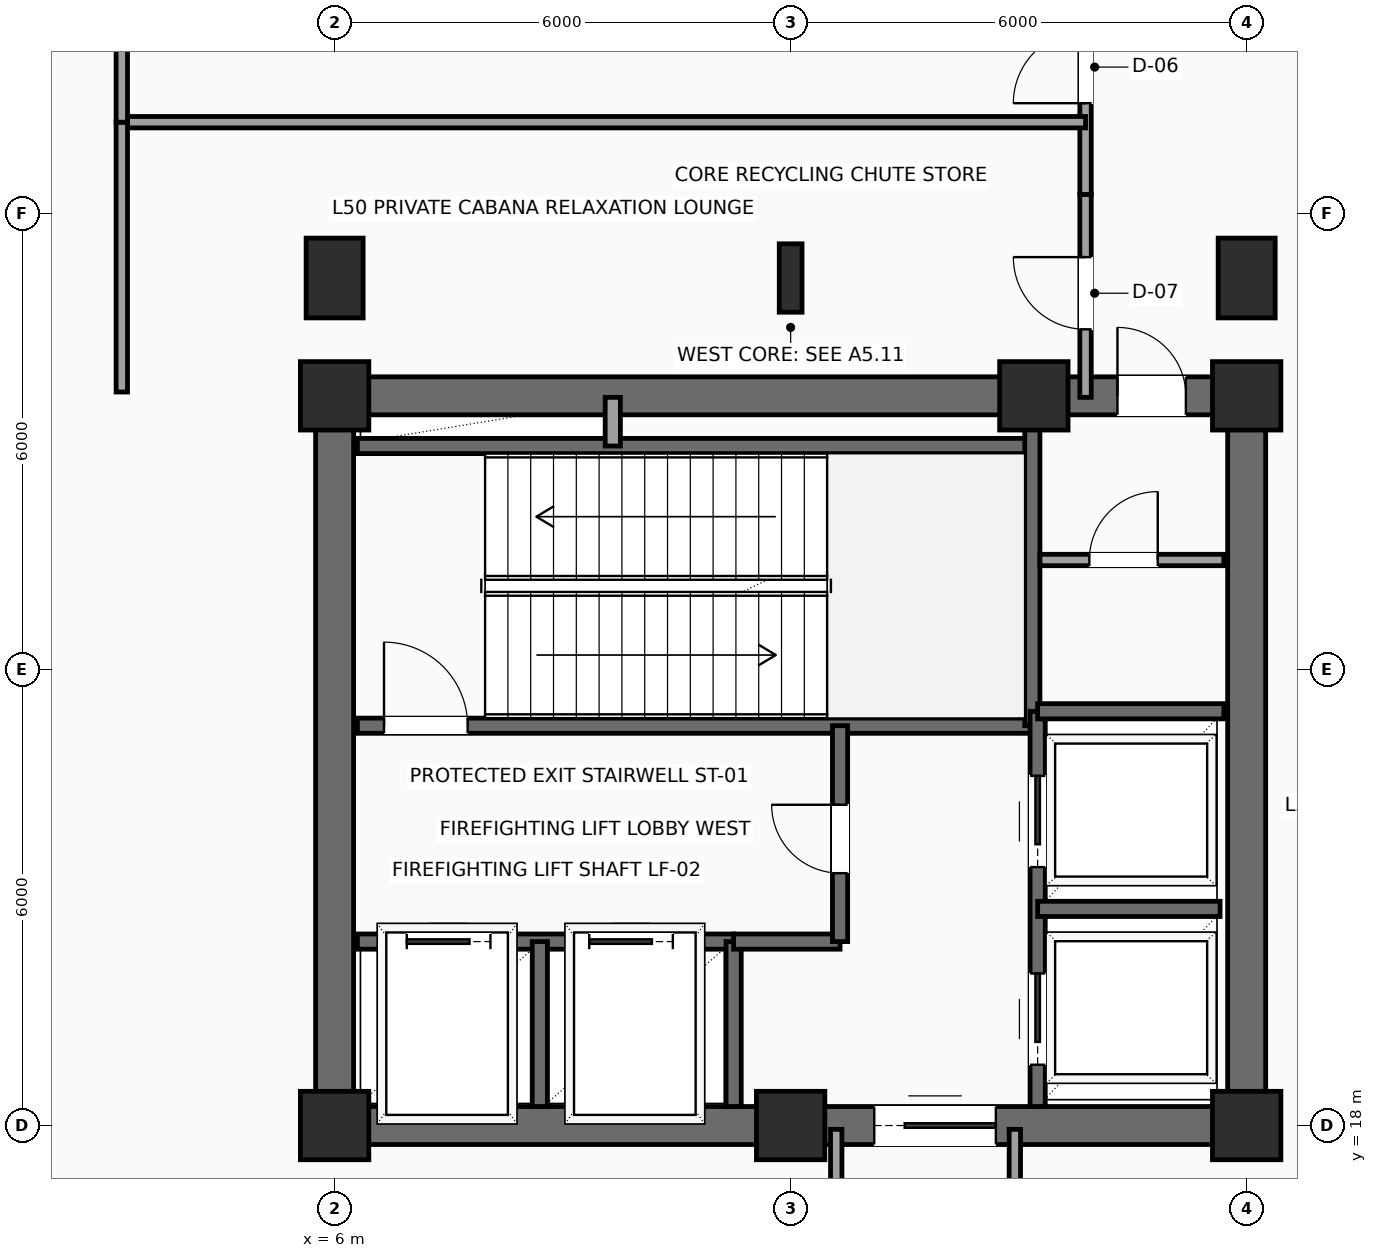
"""IFC4 building model, lengths in metres.
Left out: names, types, materials, properties, quantities, classifications, styles, units other than length and angle.
Written with IfcOpenShell. Run it as: python <this file> out.ifc"""

import sys

from ifc_helpers import new_model, si_unit, direction, frame, frame_2d, origin, origin_2d, place, context, subcontext, project, spatial, rectangle, i_section, extrude, element, fill, save


model = new_model("IFC4")
c1 = context("Model", 3, precision=1e-05, world=origin(), true_north=direction((0.0, 1.0)))
c2 = subcontext(c1, "Body", "Model", "MODEL_VIEW")
j1 = project(units=[si_unit("LENGTHUNIT", "METRE"), si_unit("PLANEANGLEUNIT", "RADIAN")], contexts=[c1])
p1 = place(None, origin())
s1 = spatial("IfcSite", under=j1, at=p1, CompositionType="ELEMENT")
p2 = place(p1, origin())
s2 = spatial("IfcBuilding", under=s1, at=p2, CompositionType="ELEMENT")
p3 = place(p2, frame((0.0, 0.0, 204.0)))
s3 = spatial("IfcBuildingStorey", under=s2, at=p3, CompositionType="ELEMENT", Elevation=204.0)
for number, where, z_axis, x_axis in (
    (1, (6.0, 18.0, 0.0), (0.0, 0.0, 1.0), (1.0, 0.0, 0.0)),
    (2, (12.0, 18.0, 0.0), (0.0, 0.0, 1.0), (1.0, 0.0, 0.0)),
    (3, (18.0, 18.0, 0.0), (0.0, 0.0, 1.0), (1.0, 0.0, 0.0)),
    (4, (6.0, 27.6, 0.0), (0.0, 0.0, 1.0), (1.0, 0.0, 0.0)),
    (5, (15.2, 27.6, 0.0), (0.0, 0.0, 1.0), (1.0, 0.0, 0.0)),
    (6, (18.0, 27.6, 0.0), (0.0, 0.0, 1.0), (1.0, 0.0, 0.0)),
):
    element("IfcColumn", number, at=place(p3, frame(where, z_axis=z_axis, x_axis=x_axis)), inside=s3, PredefinedType="COLUMN", context=c2, shape_type="SweptSolid", body=[
        extrude(rectangle(XDim=0.9, YDim=0.9, at=origin_2d()), origin(), (0.0, 0.0, 1.0), 4.65),
    ])
p4 = place(p3, frame((6.0, 29.15, 0.0), z_axis=(0.0, 0.0, 1.0), x_axis=(1.0, 0.0, 0.0)))
e7 = element("IfcColumn", 7, at=p4, inside=s3, PredefinedType="COLUMN", context=c2, shape_type="SweptSolid", body=[
    extrude(rectangle(XDim=0.75, YDim=1.05, at=origin_2d()), origin(), (0.0, 0.0, 1.0), 4.65),
])
p5 = place(p3, frame((12.0, 29.15, 0.0), z_axis=(0.0, 0.0, 1.0), x_axis=(1.0, 0.0, 0.0)))
e8 = element("IfcColumn", 8, at=p5, inside=s3, PredefinedType="COLUMN", context=c2, shape_type="SweptSolid", body=[
    extrude(i_section(OverallWidth=0.3, OverallDepth=0.9, WebThickness=0.019, FlangeThickness=0.035, FilletRadius=0.03, at=origin_2d()), origin(), (0.0, 0.0, 1.0), 4.65),
])
p6 = place(p3, frame((18.0, 29.15, 0.0), z_axis=(0.0, 0.0, 1.0), x_axis=(1.0, 0.0, 0.0)))
e9 = element("IfcColumn", 9, at=p6, inside=s3, PredefinedType="COLUMN", context=c2, shape_type="SweptSolid", body=[
    extrude(rectangle(XDim=0.75, YDim=1.05, at=origin_2d()), origin(), (0.0, 0.0, 1.0), 4.65),
])
p7 = place(p3, frame((6.0, 18.0, 0.0), z_axis=(0.0, 0.0, 1.0), x_axis=(1.0, 0.0, 0.0)))
e10 = element("IfcWall", 10, at=p7, inside=s3, PredefinedType="SHEAR", context=c2, shape_type="SweptSolid", body=[
    extrude(rectangle(XDim=12.0, YDim=0.5, at=frame_2d((6.0, 0.0))), origin(), (0.0, 0.0, 1.0), 4.44),
])
p8 = place(p7, frame((7.1, 0.0, 0.0)))
e11 = element("IfcOpeningElement", 11, at=p8, cuts=e10, PredefinedType="OPENING", context=c2, shape_type="SweptSolid", body=[
    extrude(rectangle(XDim=1.6, YDim=2.3, at=frame_2d((0.8, 1.15))), frame((0.0, 0.26, 0.0), z_axis=(0.0, -1.0, 0.0), x_axis=(1.0, 0.0, 0.0)), (0.0, 0.0, 1.0), 0.52),
])
p9 = place(p3, frame((6.0, 27.6, 0.0), z_axis=(0.0, 0.0, 1.0), x_axis=(1.0, 0.0, 0.0)))
e12 = element("IfcWall", 12, at=p9, inside=s3, PredefinedType="SHEAR", context=c2, shape_type="SweptSolid", body=[
    extrude(rectangle(XDim=12.0, YDim=0.5, at=frame_2d((6.0, 0.0))), origin(), (0.0, 0.0, 1.0), 4.44),
])
p10 = place(p9, frame((10.3, 0.0, 0.0)))
e13 = element("IfcOpeningElement", 13, at=p10, cuts=e12, PredefinedType="OPENING", context=c2, shape_type="SweptSolid", body=[
    extrude(rectangle(XDim=0.9, YDim=2.15, at=frame_2d((0.45, 1.075))), frame((0.0, 0.26, 0.0), z_axis=(0.0, -1.0, 0.0), x_axis=(1.0, 0.0, 0.0)), (0.0, 0.0, 1.0), 0.52),
])
for number, where, z_axis, x_axis in (
    (14, (6.0, 18.0, 0.0), (0.0, 0.0, 1.0), (0.0, 1.0, 0.0)),
    (15, (18.0, 18.0, 0.0), (0.0, 0.0, 1.0), (0.0, 1.0, 0.0)),
):
    element("IfcWall", number, at=place(p3, frame(where, z_axis=z_axis, x_axis=x_axis)), inside=s3, PredefinedType="SHEAR", context=c2, shape_type="SweptSolid", body=[
        extrude(rectangle(XDim=9.6, YDim=0.5, at=frame_2d((4.8, 0.0))), origin(), (0.0, 0.0, 1.0), 4.44),
    ])
p11 = place(p3, frame((6.3, 23.26, 0.0), z_axis=(0.0, 0.0, 1.0), x_axis=(1.0, 0.0, 0.0)))
e16 = element("IfcWall", 16, at=p11, inside=s3, PredefinedType="SHEAR", context=c2, shape_type="SweptSolid", body=[
    extrude(rectangle(XDim=8.88, YDim=0.2, at=frame_2d((4.44, 0.0))), origin(), (0.0, 0.0, 1.0), 4.44),
])
p12 = place(p11, frame((0.35, 0.0, 0.0)))
e17 = element("IfcOpeningElement", 17, at=p12, cuts=e16, PredefinedType="OPENING", context=c2, shape_type="SweptSolid", body=[
    extrude(rectangle(XDim=1.1, YDim=2.2, at=frame_2d((0.55, 1.1))), frame((0.0, 0.11, 0.0), z_axis=(0.0, -1.0, 0.0), x_axis=(1.0, 0.0, 0.0)), (0.0, 0.0, 1.0), 0.22),
])
p13 = place(p3, frame((6.3, 26.94, 0.0), z_axis=(0.0, 0.0, 1.0), x_axis=(1.0, 0.0, 0.0)))
e18 = element("IfcWall", 18, at=p13, inside=s3, PredefinedType="SHEAR", context=c2, shape_type="SweptSolid", body=[
    extrude(rectangle(XDim=8.88, YDim=0.2, at=frame_2d((4.44, 0.0))), origin(), (0.0, 0.0, 1.0), 4.44),
])
p14 = place(p3, frame((15.18, 23.26, 0.0), z_axis=(0.0, 0.0, 1.0), x_axis=(0.0, 1.0, 0.0)))
e19 = element("IfcWall", 19, at=p14, inside=s3, PredefinedType="SHEAR", context=c2, shape_type="SweptSolid", body=[
    extrude(rectangle(XDim=4.04, YDim=0.2, at=frame_2d((2.02, 0.0))), origin(), (0.0, 0.0, 1.0), 4.44),
])
p15 = place(p3, frame((6.3, 20.42, 0.0), z_axis=(0.0, 0.0, 1.0), x_axis=(1.0, 0.0, 0.0)))
e20 = element("IfcWall", 20, at=p15, inside=s3, PredefinedType="SHEAR", context=c2, shape_type="SweptSolid", body=[
    extrude(rectangle(XDim=4.95, YDim=0.2, at=frame_2d((2.475, 0.0))), origin(), (0.0, 0.0, 1.0), 4.44),
])
p16 = place(p15, frame((0.65, 0.0, 0.0)))
e21 = element("IfcOpeningElement", 21, at=p16, cuts=e20, PredefinedType="OPENING", context=c2, shape_type="SweptSolid", body=[
    extrude(rectangle(XDim=1.1, YDim=2.2, at=frame_2d((0.55, 1.1))), frame((0.0, 0.11, 0.0), z_axis=(0.0, -1.0, 0.0), x_axis=(1.0, 0.0, 0.0)), (0.0, 0.0, 1.0), 0.22),
])
p17 = place(p15, frame((3.05, 0.0, 0.0)))
e22 = element("IfcOpeningElement", 22, at=p17, cuts=e20, PredefinedType="OPENING", context=c2, shape_type="SweptSolid", body=[
    extrude(rectangle(XDim=1.1, YDim=2.2, at=frame_2d((0.55, 1.1))), frame((0.0, 0.11, 0.0), z_axis=(0.0, -1.0, 0.0), x_axis=(1.0, 0.0, 0.0)), (0.0, 0.0, 1.0), 0.22),
])
for number, where, z_axis, x_axis in (
    (23, (8.7, 18.25, 0.0), (0.0, 0.0, 1.0), (0.0, 1.0, 0.0)),
    (24, (11.25, 18.25, 0.0), (0.0, 0.0, 1.0), (0.0, 1.0, 0.0)),
):
    element("IfcWall", number, at=place(p3, frame(where, z_axis=z_axis, x_axis=x_axis)), inside=s3, PredefinedType="SHEAR", context=c2, shape_type="SweptSolid", body=[
        extrude(rectangle(XDim=2.17, YDim=0.2, at=frame_2d((1.085, 0.0))), origin(), (0.0, 0.0, 1.0), 4.44),
    ])
p18 = place(p3, frame((11.25, 20.42, 0.0), z_axis=(0.0, 0.0, 1.0), x_axis=(1.0, 0.0, 0.0)))
e25 = element("IfcWall", 25, at=p18, inside=s3, PredefinedType="SHEAR", context=c2, shape_type="SweptSolid", body=[
    extrude(rectangle(XDim=1.4, YDim=0.2, at=frame_2d((0.7, 0.0))), origin(), (0.0, 0.0, 1.0), 4.44),
])
p19 = place(p3, frame((12.65, 20.42, 0.0), z_axis=(0.0, 0.0, 1.0), x_axis=(0.0, 1.0, 0.0)))
e26 = element("IfcWall", 26, at=p19, inside=s3, PredefinedType="SHEAR", context=c2, shape_type="SweptSolid", body=[
    extrude(rectangle(XDim=2.84, YDim=0.2, at=frame_2d((1.42, 0.0))), origin(), (0.0, 0.0, 1.0), 4.44),
])
p20 = place(p19, frame((0.9, 0.0, 0.0)))
e27 = element("IfcOpeningElement", 27, at=p20, cuts=e26, PredefinedType="OPENING", context=c2, shape_type="SweptSolid", body=[
    extrude(rectangle(XDim=0.9, YDim=2.15, at=frame_2d((0.45, 1.075))), frame((0.0, 0.11, 0.0), z_axis=(0.0, -1.0, 0.0), x_axis=(1.0, 0.0, 0.0)), (0.0, 0.0, 1.0), 0.22),
])
p21 = place(p3, frame((9.66, 26.94, 0.0), z_axis=(0.0, 0.0, 1.0), x_axis=(0.0, 1.0, 0.0)))
e28 = element("IfcWall", 28, at=p21, inside=s3, PredefinedType="SOLIDWALL", context=c2, shape_type="SweptSolid", body=[
    extrude(rectangle(XDim=0.64, YDim=0.2, at=frame_2d((0.32, 0.0))), origin(), (0.0, 0.0, 1.0), 4.44),
])
p22 = place(p3, frame((15.25, 18.25, 0.0), z_axis=(0.0, 0.0, 1.0), x_axis=(0.0, 1.0, 0.0)))
e29 = element("IfcWall", 29, at=p22, inside=s3, PredefinedType="SHEAR", context=c2, shape_type="SweptSolid", body=[
    extrude(rectangle(XDim=5.2, YDim=0.2, at=frame_2d((2.6, 0.0))), origin(), (0.0, 0.0, 1.0), 4.44),
])
p23 = place(p22, frame((0.55, 0.0, 0.0)))
e30 = element("IfcOpeningElement", 30, at=p23, cuts=e29, PredefinedType="OPENING", context=c2, shape_type="SweptSolid", body=[
    extrude(rectangle(XDim=1.2, YDim=2.2, at=frame_2d((0.6, 1.1))), frame((0.0, 0.11, 0.0), z_axis=(0.0, -1.0, 0.0), x_axis=(1.0, 0.0, 0.0)), (0.0, 0.0, 1.0), 0.22),
])
p24 = place(p22, frame((3.15, 0.0, 0.0)))
e31 = element("IfcOpeningElement", 31, at=p24, cuts=e29, PredefinedType="OPENING", context=c2, shape_type="SweptSolid", body=[
    extrude(rectangle(XDim=1.2, YDim=2.2, at=frame_2d((0.6, 1.1))), frame((0.0, 0.11, 0.0), z_axis=(0.0, -1.0, 0.0), x_axis=(1.0, 0.0, 0.0)), (0.0, 0.0, 1.0), 0.22),
])
p25 = place(p3, frame((15.25, 20.85, 0.0), z_axis=(0.0, 0.0, 1.0), x_axis=(1.0, 0.0, 0.0)))
e32 = element("IfcWall", 32, at=p25, inside=s3, PredefinedType="SHEAR", context=c2, shape_type="SweptSolid", body=[
    extrude(rectangle(XDim=2.4, YDim=0.2, at=frame_2d((1.2, 0.0))), origin(), (0.0, 0.0, 1.0), 4.44),
])
p26 = place(p3, frame((15.25, 23.45, 0.0), z_axis=(0.0, 0.0, 1.0), x_axis=(1.0, 0.0, 0.0)))
e33 = element("IfcWall", 33, at=p26, inside=s3, PredefinedType="SHEAR", context=c2, shape_type="SweptSolid", body=[
    extrude(rectangle(XDim=2.45, YDim=0.2, at=frame_2d((1.225, 0.0))), origin(), (0.0, 0.0, 1.0), 4.44),
])
p27 = place(p3, frame((15.28, 25.44, 0.0), z_axis=(0.0, 0.0, 1.0), x_axis=(1.0, 0.0, 0.0)))
e34 = element("IfcWall", 34, at=p27, inside=s3, PredefinedType="PARTITIONING", context=c2, shape_type="SweptSolid", body=[
    extrude(rectangle(XDim=2.42, YDim=0.15, at=frame_2d((1.21, 0.0))), origin(), (0.0, 0.0, 1.0), 4.44),
])
p28 = place(p27, frame((0.65, 0.0, 0.0)))
e35 = element("IfcOpeningElement", 35, at=p28, cuts=e34, PredefinedType="OPENING", context=c2, shape_type="SweptSolid", body=[
    extrude(rectangle(XDim=0.9, YDim=2.15, at=frame_2d((0.45, 1.075))), frame((0.0, 0.085, 0.0), z_axis=(0.0, -1.0, 0.0), x_axis=(1.0, 0.0, 0.0)), (0.0, 0.0, 1.0), 0.17),
])
for number, where, z_axis, x_axis in (
    (36, (12.6, 16.15, 0.0), (0.0, 0.0, 1.0), (0.0, 1.0, 0.0)),
    (37, (14.95, 17.95, 0.0), (0.0, 0.0, 1.0), (0.0, -1.0, 0.0)),
):
    element("IfcWall", number, at=place(p3, frame(where, z_axis=z_axis, x_axis=x_axis)), inside=s3, PredefinedType="PARTITIONING", context=c2, shape_type="SweptSolid", body=[
        extrude(rectangle(XDim=1.8, YDim=0.15, at=frame_2d((0.9, 0.0))), origin(), (0.0, 0.0, 1.0), 4.44),
    ])
p29 = place(p3, frame((15.88, 27.58, 0.0), z_axis=(0.0, 0.0, 1.0), x_axis=(0.0, 1.0, 0.0)))
e38 = element("IfcWall", 38, at=p29, inside=s3, PredefinedType="PARTITIONING", context=c2, shape_type="SweptSolid", body=[
    extrude(rectangle(XDim=2.67, YDim=0.15, at=frame_2d((1.335, 0.0))), origin(), (0.0, 0.0, 1.0), 4.44),
])
p30 = place(p29, frame((0.895, 0.0, 0.0)))
e39 = element("IfcOpeningElement", 39, at=p30, cuts=e38, PredefinedType="OPENING", context=c2, shape_type="SweptSolid", body=[
    extrude(rectangle(XDim=0.95, YDim=2.15, at=frame_2d((0.475, 1.075))), frame((0.0, 0.085, 0.0), z_axis=(0.0, -1.0, 0.0), x_axis=(1.0, 0.0, 0.0)), (0.0, 0.0, 1.0), 0.17),
])
p31 = place(p3, frame((15.88, 30.25, 0.0), z_axis=(0.0, 0.0, 1.0), x_axis=(0.0, 1.0, 0.0)))
e40 = element("IfcWall", 40, at=p31, inside=s3, PredefinedType="PARTITIONING", context=c2, shape_type="SweptSolid", body=[
    extrude(rectangle(XDim=2.4, YDim=0.15, at=frame_2d((1.2, 0.0))), origin(), (0.0, 0.0, 1.0), 4.44),
])
p32 = place(p31, frame((1.2, 0.0, 0.0)))
e41 = element("IfcOpeningElement", 41, at=p32, cuts=e40, PredefinedType="OPENING", context=c2, shape_type="SweptSolid", body=[
    extrude(rectangle(XDim=0.95, YDim=2.15, at=frame_2d((0.475, 1.075))), frame((0.0, 0.085, 0.0), z_axis=(0.0, -1.0, 0.0), x_axis=(1.0, 0.0, 0.0)), (0.0, 0.0, 1.0), 0.17),
])
p33 = place(p3, frame((3.2, 31.2, 0.0), z_axis=(0.0, 0.0, 1.0), x_axis=(1.0, 0.0, 0.0)))
e42 = element("IfcWall", 42, at=p33, inside=s3, PredefinedType="PARTITIONING", context=c2, shape_type="SweptSolid", body=[
    extrude(rectangle(XDim=12.68, YDim=0.15, at=frame_2d((6.34, 0.0))), origin(), (0.0, 0.0, 1.0), 4.44),
])
p34 = place(p3, frame((3.2, 27.65, 0.0), z_axis=(0.0, 0.0, 1.0), x_axis=(0.0, 1.0, 0.0)))
e43 = element("IfcWall", 43, at=p34, inside=s3, PredefinedType="PARTITIONING", context=c2, shape_type="SweptSolid", body=[
    extrude(rectangle(XDim=3.55, YDim=0.15, at=frame_2d((1.775, 0.0))), origin(), (0.0, 0.0, 1.0), 4.44),
])
p35 = place(p3, frame((3.2, 31.2, 0.0), z_axis=(0.0, 0.0, 1.0), x_axis=(0.0, 1.0, 0.0)))
e44 = element("IfcWall", 44, at=p35, inside=s3, PredefinedType="PARTITIONING", context=c2, shape_type="SweptSolid", body=[
    extrude(rectangle(XDim=4.5, YDim=0.15, at=frame_2d((2.25, 0.0))), origin(), (0.0, 0.0, 1.0), 4.44),
])
p36 = place(p8, origin())
e45 = element("IfcDoor", 45, at=p36, inside=s3, OperationType="DOUBLE_DOOR_SLIDING", PredefinedType="DOOR", context=c2, shape_type="SweptSolid", body=[
    extrude(rectangle(XDim=1.6, YDim=2.3, at=frame_2d((0.8, 1.15))), frame((0.0, 0.025, 0.0), z_axis=(0.0, -1.0, 0.0), x_axis=(1.0, 0.0, 0.0)), (0.0, 0.0, 1.0), 0.05),
])
fill(e11, e45)
p37 = place(p10, origin())
e46 = element("IfcDoor", 46, at=p37, inside=s3, OperationType="SINGLE_SWING_LEFT", PredefinedType="DOOR", context=c2, shape_type="SweptSolid", body=[
    extrude(rectangle(XDim=0.9, YDim=2.15, at=frame_2d((0.45, 1.075))), frame((0.0, 0.025, 0.0), z_axis=(0.0, -1.0, 0.0), x_axis=(1.0, 0.0, 0.0)), (0.0, 0.0, 1.0), 0.05),
])
fill(e13, e46)
p38 = place(p12, origin())
e47 = element("IfcDoor", 47, at=p38, inside=s3, OperationType="SINGLE_SWING_LEFT", PredefinedType="DOOR", context=c2, shape_type="SweptSolid", body=[
    extrude(rectangle(XDim=1.1, YDim=2.2, at=frame_2d((0.55, 1.1))), frame((0.0, 0.025, 0.0), z_axis=(0.0, -1.0, 0.0), x_axis=(1.0, 0.0, 0.0)), (0.0, 0.0, 1.0), 0.05),
])
fill(e17, e47)
p39 = place(p16, origin())
e48 = element("IfcDoor", 48, at=p39, inside=s3, OperationType="SLIDING_TO_LEFT", PredefinedType="DOOR", context=c2, shape_type="SweptSolid", body=[
    extrude(rectangle(XDim=1.1, YDim=2.2, at=frame_2d((0.55, 1.1))), frame((0.0, 0.025, 0.0), z_axis=(0.0, -1.0, 0.0), x_axis=(1.0, 0.0, 0.0)), (0.0, 0.0, 1.0), 0.05),
])
fill(e21, e48)
p40 = place(p17, origin())
e49 = element("IfcDoor", 49, at=p40, inside=s3, OperationType="SLIDING_TO_LEFT", PredefinedType="DOOR", context=c2, shape_type="SweptSolid", body=[
    extrude(rectangle(XDim=1.1, YDim=2.2, at=frame_2d((0.55, 1.1))), frame((0.0, 0.025, 0.0), z_axis=(0.0, -1.0, 0.0), x_axis=(1.0, 0.0, 0.0)), (0.0, 0.0, 1.0), 0.05),
])
fill(e22, e49)
p41 = place(p20, origin())
e50 = element("IfcDoor", 50, at=p41, inside=s3, OperationType="SINGLE_SWING_RIGHT", PredefinedType="DOOR", context=c2, shape_type="SweptSolid", body=[
    extrude(rectangle(XDim=0.9, YDim=2.15, at=frame_2d((0.45, 1.075))), frame((0.0, 0.025, 0.0), z_axis=(0.0, -1.0, 0.0), x_axis=(1.0, 0.0, 0.0)), (0.0, 0.0, 1.0), 0.05),
])
fill(e27, e50)
p42 = place(p23, origin())
e51 = element("IfcDoor", 51, at=p42, inside=s3, OperationType="SLIDING_TO_RIGHT", PredefinedType="DOOR", context=c2, shape_type="SweptSolid", body=[
    extrude(rectangle(XDim=1.2, YDim=2.2, at=frame_2d((0.6, 1.1))), frame((0.0, 0.025, 0.0), z_axis=(0.0, -1.0, 0.0), x_axis=(1.0, 0.0, 0.0)), (0.0, 0.0, 1.0), 0.05),
])
fill(e30, e51)
p43 = place(p24, origin())
e52 = element("IfcDoor", 52, at=p43, inside=s3, OperationType="SLIDING_TO_RIGHT", PredefinedType="DOOR", context=c2, shape_type="SweptSolid", body=[
    extrude(rectangle(XDim=1.2, YDim=2.2, at=frame_2d((0.6, 1.1))), frame((0.0, 0.025, 0.0), z_axis=(0.0, -1.0, 0.0), x_axis=(1.0, 0.0, 0.0)), (0.0, 0.0, 1.0), 0.05),
])
fill(e31, e52)
p44 = place(p28, origin())
e53 = element("IfcDoor", 53, at=p44, inside=s3, OperationType="SINGLE_SWING_RIGHT", PredefinedType="DOOR", context=c2, shape_type="SweptSolid", body=[
    extrude(rectangle(XDim=0.9, YDim=2.15, at=frame_2d((0.45, 1.075))), frame((0.0, 0.025, 0.0), z_axis=(0.0, -1.0, 0.0), x_axis=(1.0, 0.0, 0.0)), (0.0, 0.0, 1.0), 0.05),
])
fill(e35, e53)
p45 = place(p30, origin())
e54 = element("IfcDoor", 54, at=p45, inside=s3, OperationType="SINGLE_SWING_RIGHT", PredefinedType="DOOR", context=c2, shape_type="SweptSolid", body=[
    extrude(rectangle(XDim=0.95, YDim=2.15, at=frame_2d((0.475, 1.075))), frame((0.0, 0.025, 0.0), z_axis=(0.0, -1.0, 0.0), x_axis=(1.0, 0.0, 0.0)), (0.0, 0.0, 1.0), 0.05),
])
fill(e39, e54)
p46 = place(p32, origin())
e55 = element("IfcDoor", 55, at=p46, inside=s3, OperationType="SINGLE_SWING_LEFT", PredefinedType="DOOR", context=c2, shape_type="SweptSolid", body=[
    extrude(rectangle(XDim=0.95, YDim=2.15, at=frame_2d((0.475, 1.075))), frame((0.0, 0.025, 0.0), z_axis=(0.0, -1.0, 0.0), x_axis=(1.0, 0.0, 0.0)), (0.0, 0.0, 1.0), 0.05),
])
fill(e41, e55)
save(model, sys.argv[1])
